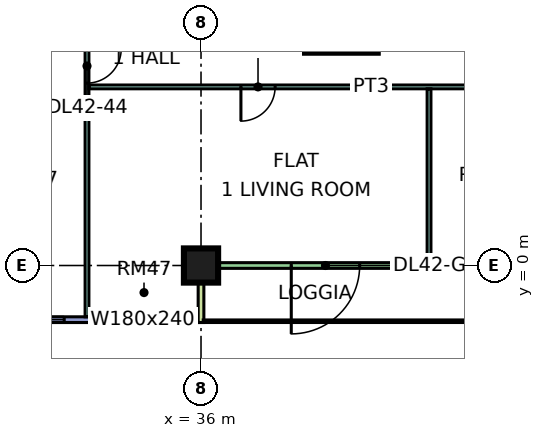
"""IFC4 building model, lengths in metres.
Left out: names, types, materials, properties, quantities, classifications, styles, units other than length and angle.
Written with IfcOpenShell. Run it as: python <this file> out.ifc"""

import sys

from ifc_helpers import new_model, si_unit, direction, frame, frame_2d, origin, origin_2d, place, context, subcontext, project, spatial, rectangle, extrude, element, fill, save


model = new_model("IFC4")
c1 = context("Model", 3, precision=1e-05, world=origin(), true_north=direction((0.0, 1.0)))
c2 = subcontext(c1, "Body", "Model", "MODEL_VIEW")
j1 = project(units=[si_unit("LENGTHUNIT", "METRE"), si_unit("PLANEANGLEUNIT", "RADIAN")], contexts=[c1])
p1 = place(None, origin())
s1 = spatial("IfcSite", under=j1, at=p1, CompositionType="ELEMENT")
p2 = place(p1, origin())
s2 = spatial("IfcBuilding", under=s1, at=p2, CompositionType="ELEMENT")
p3 = place(p2, frame((0.0, 0.0, 183.65)))
s3 = spatial("IfcBuildingStorey", under=s2, at=p3, CompositionType="ELEMENT", Elevation=183.65)
p4 = place(p3, frame((36.0, 0.0, 0.0), z_axis=(0.0, 0.0, 1.0), x_axis=(1.0, 0.0, 0.0)))
e1 = element("IfcColumn", 1, at=p4, inside=s3, PredefinedType="COLUMN", context=c2, shape_type="SweptSolid", body=[
    extrude(rectangle(XDim=0.9, YDim=0.9, at=origin_2d()), origin(), (0.0, 0.0, 1.0), 3.75),
])
p5 = place(p3, frame((37.2, 5.725, 0.0), z_axis=(0.0, 0.0, 1.0), x_axis=(1.0, 0.0, 0.0)))
e2 = element("IfcWall", 2, at=p5, inside=s3, PredefinedType="SHEAR", context=c2, shape_type="SweptSolid", body=[
    extrude(rectangle(XDim=3.45, YDim=0.25, at=frame_2d((1.725, 0.0))), origin(), (0.0, 0.0, 1.0), 3.75),
])
p6 = place(p3, frame((24.075, -1.425, 0.0), z_axis=(0.0, 0.0, 1.0), x_axis=(1.0, 0.0, 0.0)))
e3 = element("IfcWall", 3, at=p6, inside=s3, PredefinedType="SOLIDWALL", context=c2, shape_type="SweptSolid", body=[
    extrude(rectangle(XDim=11.85, YDim=0.15, at=frame_2d((5.925, 0.0))), origin(), (0.0, 0.0, 1.0), 3.35),
])
p7 = place(p6, frame((0.562, 0.0, 0.45)))
e4 = element("IfcOpeningElement", 4, at=p7, cuts=e3, PredefinedType="OPENING", context=c2, shape_type="SweptSolid", body=[
    extrude(rectangle(XDim=1.8, YDim=2.4, at=frame_2d((0.9, 1.2))), frame((0.0, 0.085, 0.0), z_axis=(0.0, -1.0, 0.0), x_axis=(1.0, 0.0, 0.0)), (0.0, 0.0, 1.0), 0.17),
])
p8 = place(p6, frame((3.525, 0.0, 0.45)))
e5 = element("IfcOpeningElement", 5, at=p8, cuts=e3, PredefinedType="OPENING", context=c2, shape_type="SweptSolid", body=[
    extrude(rectangle(XDim=1.8, YDim=2.4, at=frame_2d((0.9, 1.2))), frame((0.0, 0.085, 0.0), z_axis=(0.0, -1.0, 0.0), x_axis=(1.0, 0.0, 0.0)), (0.0, 0.0, 1.0), 0.17),
])
p9 = place(p6, frame((6.525, 0.0, 0.45)))
e6 = element("IfcOpeningElement", 6, at=p9, cuts=e3, PredefinedType="OPENING", context=c2, shape_type="SweptSolid", body=[
    extrude(rectangle(XDim=1.8, YDim=2.4, at=frame_2d((0.9, 1.2))), frame((0.0, 0.085, 0.0), z_axis=(0.0, -1.0, 0.0), x_axis=(1.0, 0.0, 0.0)), (0.0, 0.0, 1.0), 0.17),
])
p10 = place(p6, frame((9.488, 0.0, 0.45)))
e7 = element("IfcOpeningElement", 7, at=p10, cuts=e3, PredefinedType="OPENING", context=c2, shape_type="SweptSolid", body=[
    extrude(rectangle(XDim=1.8, YDim=2.4, at=frame_2d((0.9, 1.2))), frame((0.0, 0.085, 0.0), z_axis=(0.0, -1.0, 0.0), x_axis=(1.0, 0.0, 0.0)), (0.0, 0.0, 1.0), 0.17),
])
p11 = place(p3, frame((36.075, 0.0, 0.0), z_axis=(0.0, 0.0, 1.0), x_axis=(1.0, 0.0, 0.0)))
e8 = element("IfcWall", 8, at=p11, inside=s3, PredefinedType="SOLIDWALL", context=c2, shape_type="SweptSolid", body=[
    extrude(rectangle(XDim=11.85, YDim=0.15, at=frame_2d((5.925, 0.0))), origin(), (0.0, 0.0, 1.0), 3.35),
])
p12 = place(p11, frame((2.3, 0.0, 0.0)))
e9 = element("IfcOpeningElement", 9, at=p12, cuts=e8, PredefinedType="OPENING", context=c2, shape_type="SweptSolid", body=[
    extrude(rectangle(XDim=1.8, YDim=2.4, at=frame_2d((0.9, 1.2))), frame((0.0, 0.085, 0.0), z_axis=(0.0, -1.0, 0.0), x_axis=(1.0, 0.0, 0.0)), (0.0, 0.0, 1.0), 0.17),
])
p13 = place(p11, frame((6.55, 0.0, 0.45)))
e10 = element("IfcOpeningElement", 10, at=p13, cuts=e8, PredefinedType="OPENING", context=c2, shape_type="SweptSolid", body=[
    extrude(rectangle(XDim=1.2, YDim=2.4, at=frame_2d((0.6, 1.2))), frame((0.0, 0.085, 0.0), z_axis=(0.0, -1.0, 0.0), x_axis=(1.0, 0.0, 0.0)), (0.0, 0.0, 1.0), 0.17),
])
p14 = place(p11, frame((10.062, 0.0, 0.45)))
e11 = element("IfcOpeningElement", 11, at=p14, cuts=e8, PredefinedType="OPENING", context=c2, shape_type="SweptSolid", body=[
    extrude(rectangle(XDim=1.2, YDim=2.4, at=frame_2d((0.6, 1.2))), frame((0.0, 0.085, 0.0), z_axis=(0.0, -1.0, 0.0), x_axis=(1.0, 0.0, 0.0)), (0.0, 0.0, 1.0), 0.17),
])
p15 = place(p3, frame((36.0, -1.5, 0.0), z_axis=(0.0, 0.0, 1.0), x_axis=(0.0, 1.0, 0.0)))
e12 = element("IfcWall", 12, at=p15, inside=s3, PredefinedType="SOLIDWALL", context=c2, shape_type="SweptSolid", body=[
    extrude(rectangle(XDim=1.5, YDim=0.15, at=frame_2d((0.75, 0.0))), origin(), (0.0, 0.0, 1.0), 3.35),
])
p16 = place(p3, frame((33.0, -1.35, 0.0), z_axis=(0.0, 0.0, 1.0), x_axis=(0.0, 1.0, 0.0)))
e13 = element("IfcWall", 13, at=p16, inside=s3, PredefinedType="PARTITIONING", context=c2, shape_type="SweptSolid", body=[
    extrude(rectangle(XDim=7.2, YDim=0.1, at=frame_2d((3.6, 0.0))), origin(), (0.0, 0.0, 1.0), 3.35),
])
p17 = place(p16, frame((6.15, 0.0, 0.0)))
e14 = element("IfcOpeningElement", 14, at=p17, cuts=e13, PredefinedType="OPENING", context=c2, shape_type="SweptSolid", body=[
    extrude(rectangle(XDim=0.9, YDim=2.1, at=frame_2d((0.45, 1.05))), frame((0.0, 0.06, 0.0), z_axis=(0.0, -1.0, 0.0), x_axis=(1.0, 0.0, 0.0)), (0.0, 0.0, 1.0), 0.12),
])
p18 = place(p3, frame((33.05, 4.7, 0.0), z_axis=(0.0, 0.0, 1.0), x_axis=(1.0, 0.0, 0.0)))
e15 = element("IfcWall", 15, at=p18, inside=s3, PredefinedType="PARTITIONING", context=c2, shape_type="SweptSolid", body=[
    extrude(rectangle(XDim=14.85, YDim=0.1, at=frame_2d((7.425, 0.0))), origin(), (0.0, 0.0, 1.0), 3.35),
])
p19 = place(p18, frame((10.0, 0.0, 0.0)))
e16 = element("IfcOpeningElement", 16, at=p19, cuts=e15, PredefinedType="OPENING", context=c2, shape_type="SweptSolid", body=[
    extrude(rectangle(XDim=0.9, YDim=2.1, at=frame_2d((0.45, 1.05))), frame((0.0, 0.06, 0.0), z_axis=(0.0, -1.0, 0.0), x_axis=(1.0, 0.0, 0.0)), (0.0, 0.0, 1.0), 0.12),
])
p20 = place(p18, frame((13.0, 0.0, 0.0)))
e17 = element("IfcOpeningElement", 17, at=p20, cuts=e15, PredefinedType="OPENING", context=c2, shape_type="SweptSolid", body=[
    extrude(rectangle(XDim=0.9, YDim=2.1, at=frame_2d((0.45, 1.05))), frame((0.0, 0.06, 0.0), z_axis=(0.0, -1.0, 0.0), x_axis=(1.0, 0.0, 0.0)), (0.0, 0.0, 1.0), 0.12),
])
p21 = place(p18, frame((4.0, 0.0, 0.0)))
e18 = element("IfcOpeningElement", 18, at=p21, cuts=e15, PredefinedType="OPENING", context=c2, shape_type="SweptSolid", body=[
    extrude(rectangle(XDim=0.9, YDim=2.1, at=frame_2d((0.45, 1.05))), frame((0.0, 0.06, 0.0), z_axis=(0.0, -1.0, 0.0), x_axis=(1.0, 0.0, 0.0)), (0.0, 0.0, 1.0), 0.12),
])
p22 = place(p3, frame((42.0, 0.074, 0.0), z_axis=(0.0, 0.0, 1.0), x_axis=(0.0, 1.0, 0.0)))
e19 = element("IfcWall", 19, at=p22, inside=s3, PredefinedType="PARTITIONING", context=c2, shape_type="SweptSolid", body=[
    extrude(rectangle(XDim=4.576, YDim=0.1, at=frame_2d((2.288, 0.0))), origin(), (0.0, 0.0, 1.0), 3.35),
])
p23 = place(p9, origin())
e20 = element("IfcWindow", 20, at=p23, inside=s3, PartitioningType="SINGLE_PANEL", PredefinedType="WINDOW", context=c2, shape_type="SweptSolid", body=[
    extrude(rectangle(XDim=1.8, YDim=2.4, at=frame_2d((0.9, 1.2))), frame((0.0, 0.03, 0.0), z_axis=(0.0, -1.0, 0.0), x_axis=(1.0, 0.0, 0.0)), (0.0, 0.0, 1.0), 0.06),
])
fill(e6, e20)
p24 = place(p10, origin())
e21 = element("IfcWindow", 21, at=p24, inside=s3, PartitioningType="SINGLE_PANEL", PredefinedType="WINDOW", context=c2, shape_type="SweptSolid", body=[
    extrude(rectangle(XDim=1.8, YDim=2.4, at=frame_2d((0.9, 1.2))), frame((0.0, 0.03, 0.0), z_axis=(0.0, -1.0, 0.0), x_axis=(1.0, 0.0, 0.0)), (0.0, 0.0, 1.0), 0.06),
])
fill(e7, e21)
p25 = place(p12, frame((1.8, 0.0, 0.0), z_axis=(0.0, 0.0, 1.0), x_axis=(-1.0, 0.0, 0.0)))
e22 = element("IfcDoor", 22, at=p25, inside=s3, OperationType="DOUBLE_DOOR_SINGLE_SWING", PredefinedType="DOOR", context=c2, shape_type="SweptSolid", body=[
    extrude(rectangle(XDim=1.8, YDim=2.4, at=frame_2d((0.9, 1.2))), frame((0.0, 0.025, 0.0), z_axis=(0.0, -1.0, 0.0), x_axis=(1.0, 0.0, 0.0)), (0.0, 0.0, 1.0), 0.05),
])
fill(e9, e22)
p26 = place(p13, origin())
e23 = element("IfcWindow", 23, at=p26, inside=s3, PartitioningType="SINGLE_PANEL", PredefinedType="WINDOW", context=c2, shape_type="SweptSolid", body=[
    extrude(rectangle(XDim=1.2, YDim=2.4, at=frame_2d((0.6, 1.2))), frame((0.0, 0.03, 0.0), z_axis=(0.0, -1.0, 0.0), x_axis=(1.0, 0.0, 0.0)), (0.0, 0.0, 1.0), 0.06),
])
fill(e10, e23)
p27 = place(p17, origin())
e24 = element("IfcDoor", 24, at=p27, inside=s3, OperationType="SINGLE_SWING_RIGHT", PredefinedType="DOOR", context=c2, shape_type="SweptSolid", body=[
    extrude(rectangle(XDim=0.9, YDim=2.1, at=frame_2d((0.45, 1.05))), frame((0.0, 0.025, 0.0), z_axis=(0.0, -1.0, 0.0), x_axis=(1.0, 0.0, 0.0)), (0.0, 0.0, 1.0), 0.05),
])
fill(e14, e24)
p28 = place(p21, frame((0.9, 0.0, 0.0), z_axis=(0.0, 0.0, 1.0), x_axis=(-1.0, 0.0, 0.0)))
e25 = element("IfcDoor", 25, at=p28, inside=s3, OperationType="SINGLE_SWING_LEFT", PredefinedType="DOOR", context=c2, shape_type="SweptSolid", body=[
    extrude(rectangle(XDim=0.9, YDim=2.1, at=frame_2d((0.45, 1.05))), frame((0.0, 0.025, 0.0), z_axis=(0.0, -1.0, 0.0), x_axis=(1.0, 0.0, 0.0)), (0.0, 0.0, 1.0), 0.05),
])
fill(e18, e25)
save(model, sys.argv[1])
